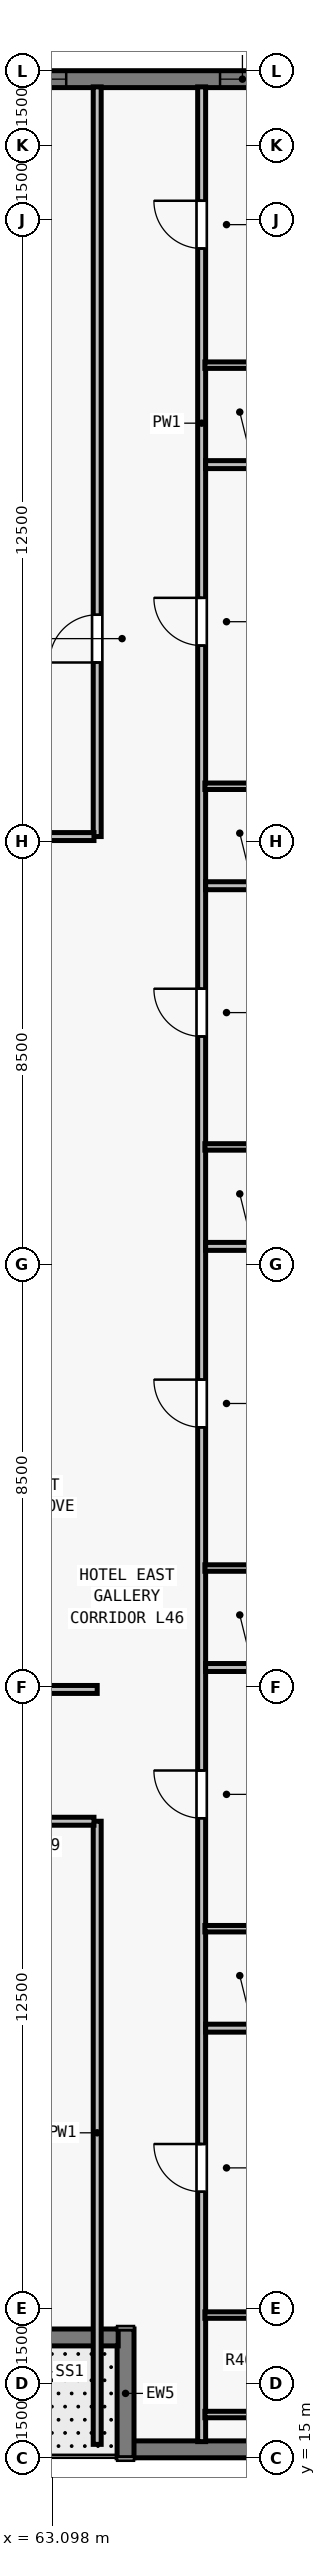
"""IFC4 building model, lengths in metres.
Left out: names, types, materials, properties, quantities, classifications, styles, units other than length and angle.
Written with IfcOpenShell. Run it as: python <this file> out.ifc"""

import sys

from ifc_helpers import new_model, si_unit, direction, frame, frame_2d, origin, place, context, subcontext, project, spatial, rectangle, extrude, element, fill, save


model = new_model("IFC4")
c1 = context("Model", 3, precision=1e-05, world=origin(), true_north=direction((0.0, 1.0)))
c2 = subcontext(c1, "Body", "Model", "MODEL_VIEW")
j1 = project(units=[si_unit("LENGTHUNIT", "METRE"), si_unit("PLANEANGLEUNIT", "RADIAN")], contexts=[c1])
p1 = place(None, origin())
s1 = spatial("IfcSite", under=j1, at=p1, CompositionType="ELEMENT")
p2 = place(p1, origin())
s2 = spatial("IfcBuilding", under=s1, at=p2, CompositionType="ELEMENT")
p3 = place(p2, frame((0.0, 0.0, 169.0)))
s3 = spatial("IfcBuildingStorey", under=s2, at=p3, CompositionType="ELEMENT", Elevation=169.0)
p4 = place(p3, frame((32.0, 62.83, 0.0), z_axis=(0.0, 0.0, 1.0), x_axis=(1.0, 0.0, 0.0)))
e1 = element("IfcWall", 1, at=p4, inside=s3, PredefinedType="SOLIDWALL", context=c2, shape_type="SweptSolid", body=[
    extrude(rectangle(XDim=39.682, YDim=0.34, at=frame_2d((19.841, 0.0))), origin(), (0.0, 0.0, 1.0), 3.28),
])
p5 = place(p4, frame((4.952, 0.0, 0.8)))
e2 = element("IfcOpeningElement", 2, at=p5, cuts=e1, PredefinedType="OPENING", context=c2, shape_type="SweptSolid", body=[
    extrude(rectangle(XDim=1.35, YDim=1.66, at=frame_2d((0.675, 0.83))), frame((0.0, 0.18, 0.0), z_axis=(0.0, -1.0, 0.0), x_axis=(1.0, 0.0, 0.0)), (0.0, 0.0, 1.0), 0.36),
])
p6 = place(p4, frame((12.059, 0.0, 0.8)))
e3 = element("IfcOpeningElement", 3, at=p6, cuts=e1, PredefinedType="OPENING", context=c2, shape_type="SweptSolid", body=[
    extrude(rectangle(XDim=1.35, YDim=1.66, at=frame_2d((0.675, 0.83))), frame((0.0, 0.18, 0.0), z_axis=(0.0, -1.0, 0.0), x_axis=(1.0, 0.0, 0.0)), (0.0, 0.0, 1.0), 0.36),
])
p7 = place(p4, frame((19.166, 0.0, 0.8)))
e4 = element("IfcOpeningElement", 4, at=p7, cuts=e1, PredefinedType="OPENING", context=c2, shape_type="SweptSolid", body=[
    extrude(rectangle(XDim=1.35, YDim=1.66, at=frame_2d((0.675, 0.83))), frame((0.0, 0.18, 0.0), z_axis=(0.0, -1.0, 0.0), x_axis=(1.0, 0.0, 0.0)), (0.0, 0.0, 1.0), 0.36),
])
p8 = place(p4, frame((21.27, 0.0, 0.8)))
e5 = element("IfcOpeningElement", 5, at=p8, cuts=e1, PredefinedType="OPENING", context=c2, shape_type="SweptSolid", body=[
    extrude(rectangle(XDim=1.75, YDim=1.66, at=frame_2d((0.875, 0.83))), frame((0.0, 0.18, 0.0), z_axis=(0.0, -1.0, 0.0), x_axis=(1.0, 0.0, 0.0)), (0.0, 0.0, 1.0), 0.36),
])
p9 = place(p4, frame((26.273, 0.0, 0.8)))
e6 = element("IfcOpeningElement", 6, at=p9, cuts=e1, PredefinedType="OPENING", context=c2, shape_type="SweptSolid", body=[
    extrude(rectangle(XDim=1.35, YDim=1.66, at=frame_2d((0.675, 0.83))), frame((0.0, 0.18, 0.0), z_axis=(0.0, -1.0, 0.0), x_axis=(1.0, 0.0, 0.0)), (0.0, 0.0, 1.0), 0.36),
])
p10 = place(p4, frame((29.627, 0.0, 0.8)))
e7 = element("IfcOpeningElement", 7, at=p10, cuts=e1, PredefinedType="OPENING", context=c2, shape_type="SweptSolid", body=[
    extrude(rectangle(XDim=1.75, YDim=1.66, at=frame_2d((0.875, 0.83))), frame((0.0, 0.18, 0.0), z_axis=(0.0, -1.0, 0.0), x_axis=(1.0, 0.0, 0.0)), (0.0, 0.0, 1.0), 0.36),
])
p11 = place(p4, frame((34.47, 0.0, 0.8)))
e8 = element("IfcOpeningElement", 8, at=p11, cuts=e1, PredefinedType="OPENING", context=c2, shape_type="SweptSolid", body=[
    extrude(rectangle(XDim=0.9, YDim=1.66, at=frame_2d((0.45, 0.83))), frame((0.0, 0.18, 0.0), z_axis=(0.0, -1.0, 0.0), x_axis=(1.0, 0.0, 0.0)), (0.0, 0.0, 1.0), 0.36),
])
p12 = place(p3, frame((72.0, 15.17, 0.0), z_axis=(0.0, 0.0, 1.0), x_axis=(-1.0, 0.0, 0.0)))
e9 = element("IfcWall", 9, at=p12, inside=s3, PredefinedType="SOLIDWALL", context=c2, shape_type="SweptSolid", body=[
    extrude(rectangle(XDim=7.282, YDim=0.34, at=frame_2d((3.641, 0.0))), origin(), (0.0, 0.0, 1.0), 3.28),
])
p13 = place(p3, frame((64.57, 15.0, 0.0), z_axis=(0.0, 0.0, 1.0), x_axis=(0.0, 1.0, 0.0)))
e10 = element("IfcWall", 10, at=p13, inside=s3, PredefinedType="SOLIDWALL", context=c2, shape_type="SweptSolid", body=[
    extrude(rectangle(XDim=2.59, YDim=0.34, at=frame_2d((1.295, 0.0))), origin(), (0.0, 0.0, 1.0), 3.28),
])
p14 = place(p3, frame((64.422, 17.42, 0.0), z_axis=(0.0, 0.0, 1.0), x_axis=(-1.0, 0.0, 0.0)))
e11 = element("IfcWall", 11, at=p14, inside=s3, PredefinedType="SOLIDWALL", context=c2, shape_type="SweptSolid", body=[
    extrude(rectangle(XDim=5.762, YDim=0.34, at=frame_2d((2.881, 0.0))), origin(), (0.0, 0.0, 1.0), 3.28),
])
p15 = place(p14, frame((2.381, 0.0, 0.0)))
e12 = element("IfcOpeningElement", 12, at=p15, cuts=e11, PredefinedType="OPENING", context=c2, shape_type="SweptSolid", body=[
    extrude(rectangle(XDim=1.0, YDim=2.15, at=frame_2d((0.5, 1.075))), frame((0.0, 0.18, 0.0), z_axis=(0.0, -1.0, 0.0), x_axis=(1.0, 0.0, 0.0)), (0.0, 0.0, 1.0), 0.36),
])
p16 = place(p3, frame((66.1, 15.325, 0.0), z_axis=(0.0, 0.0, 1.0), x_axis=(0.0, 1.0, 0.0)))
e13 = element("IfcWall", 13, at=p16, inside=s3, PredefinedType="PARTITIONING", context=c2, shape_type="SweptSolid", body=[
    extrude(rectangle(XDim=47.35, YDim=0.16, at=frame_2d((23.675, 0.0))), origin(), (0.0, 0.0, 1.0), 2.555),
])
p17 = place(p16, frame((5.025, 0.0, 0.0)))
e14 = element("IfcOpeningElement", 14, at=p17, cuts=e13, PredefinedType="OPENING", context=c2, shape_type="SweptSolid", body=[
    extrude(rectangle(XDim=0.96, YDim=2.15, at=frame_2d((0.48, 1.075))), frame((0.0, 0.09, 0.0), z_axis=(0.0, -1.0, 0.0), x_axis=(1.0, 0.0, 0.0)), (0.0, 0.0, 1.0), 0.18),
])
p18 = place(p16, frame((12.535, 0.0, 0.0)))
e15 = element("IfcOpeningElement", 15, at=p18, cuts=e13, PredefinedType="OPENING", context=c2, shape_type="SweptSolid", body=[
    extrude(rectangle(XDim=0.96, YDim=2.15, at=frame_2d((0.48, 1.075))), frame((0.0, 0.09, 0.0), z_axis=(0.0, -1.0, 0.0), x_axis=(1.0, 0.0, 0.0)), (0.0, 0.0, 1.0), 0.18),
])
p19 = place(p16, frame((20.395, 0.0, 0.0)))
e16 = element("IfcOpeningElement", 16, at=p19, cuts=e13, PredefinedType="OPENING", context=c2, shape_type="SweptSolid", body=[
    extrude(rectangle(XDim=0.96, YDim=2.15, at=frame_2d((0.48, 1.075))), frame((0.0, 0.09, 0.0), z_axis=(0.0, -1.0, 0.0), x_axis=(1.0, 0.0, 0.0)), (0.0, 0.0, 1.0), 0.18),
])
p20 = place(p16, frame((28.255, 0.0, 0.0)))
e17 = element("IfcOpeningElement", 17, at=p20, cuts=e13, PredefinedType="OPENING", context=c2, shape_type="SweptSolid", body=[
    extrude(rectangle(XDim=0.96, YDim=2.15, at=frame_2d((0.48, 1.075))), frame((0.0, 0.09, 0.0), z_axis=(0.0, -1.0, 0.0), x_axis=(1.0, 0.0, 0.0)), (0.0, 0.0, 1.0), 0.18),
])
p21 = place(p16, frame((36.115, 0.0, 0.0)))
e18 = element("IfcOpeningElement", 18, at=p21, cuts=e13, PredefinedType="OPENING", context=c2, shape_type="SweptSolid", body=[
    extrude(rectangle(XDim=0.96, YDim=2.15, at=frame_2d((0.48, 1.075))), frame((0.0, 0.09, 0.0), z_axis=(0.0, -1.0, 0.0), x_axis=(1.0, 0.0, 0.0)), (0.0, 0.0, 1.0), 0.18),
])
p22 = place(p16, frame((44.1, 0.0, 0.0)))
e19 = element("IfcOpeningElement", 19, at=p22, cuts=e13, PredefinedType="OPENING", context=c2, shape_type="SweptSolid", body=[
    extrude(rectangle(XDim=0.96, YDim=2.15, at=frame_2d((0.48, 1.075))), frame((0.0, 0.09, 0.0), z_axis=(0.0, -1.0, 0.0), x_axis=(1.0, 0.0, 0.0)), (0.0, 0.0, 1.0), 0.18),
])
p23 = place(p3, frame((64.0, 15.27, 0.0), z_axis=(0.0, 0.0, 1.0), x_axis=(0.0, 1.0, 0.0)))
e20 = element("IfcWall", 20, at=p23, inside=s3, PredefinedType="PARTITIONING", context=c2, shape_type="SweptSolid", body=[
    extrude(rectangle(XDim=12.53, YDim=0.16, at=frame_2d((6.265, 0.0))), origin(), (0.0, 0.0, 1.0), 2.555),
])
p24 = place(p3, frame((64.0, 47.6, 0.0), z_axis=(0.0, 0.0, 1.0), x_axis=(0.0, 1.0, 0.0)))
e21 = element("IfcWall", 21, at=p24, inside=s3, PredefinedType="PARTITIONING", context=c2, shape_type="SweptSolid", body=[
    extrude(rectangle(XDim=15.075, YDim=0.16, at=frame_2d((7.538, 0.0))), origin(), (0.0, 0.0, 1.0), 2.555),
])
p25 = place(p24, frame((3.5, 0.0, 0.0)))
e22 = element("IfcOpeningElement", 22, at=p25, cuts=e21, PredefinedType="OPENING", context=c2, shape_type="SweptSolid", body=[
    extrude(rectangle(XDim=0.96, YDim=2.12, at=frame_2d((0.48, 1.06))), frame((0.0, 0.09, 0.0), z_axis=(0.0, -1.0, 0.0), x_axis=(1.0, 0.0, 0.0)), (0.0, 0.0, 1.0), 0.18),
])
p26 = place(p3, frame((60.765, 30.45, 0.0), z_axis=(0.0, 0.0, 1.0), x_axis=(1.0, 0.0, 0.0)))
e23 = element("IfcWall", 23, at=p26, inside=s3, PredefinedType="PARTITIONING", context=c2, shape_type="SweptSolid", body=[
    extrude(rectangle(XDim=3.235, YDim=0.16, at=frame_2d((1.618, 0.0))), origin(), (0.0, 0.0, 1.0), 3.28),
])
p27 = place(p3, frame((60.765, 47.6, 0.0), z_axis=(0.0, 0.0, 1.0), x_axis=(1.0, 0.0, 0.0)))
e24 = element("IfcWall", 24, at=p27, inside=s3, PredefinedType="PARTITIONING", context=c2, shape_type="SweptSolid", body=[
    extrude(rectangle(XDim=3.17, YDim=0.16, at=frame_2d((1.585, 0.0))), origin(), (0.0, 0.0, 1.0), 3.28),
])
p28 = place(p3, frame((41.865, 27.8, 0.0), z_axis=(0.0, 0.0, 1.0), x_axis=(1.0, 0.0, 0.0)))
e25 = element("IfcWall", 25, at=p28, inside=s3, PredefinedType="PARTITIONING", context=c2, shape_type="SweptSolid", body=[
    extrude(rectangle(XDim=22.07, YDim=0.16, at=frame_2d((11.035, 0.0))), origin(), (0.0, 0.0, 1.0), 3.28),
])
p29 = place(p28, frame((4.232, 0.0, 0.0)))
e26 = element("IfcOpeningElement", 26, at=p29, cuts=e25, PredefinedType="OPENING", context=c2, shape_type="SweptSolid", body=[
    extrude(rectangle(XDim=0.96, YDim=2.15, at=frame_2d((0.48, 1.075))), frame((0.0, 0.09, 0.0), z_axis=(0.0, -1.0, 0.0), x_axis=(1.0, 0.0, 0.0)), (0.0, 0.0, 1.0), 0.18),
])
p30 = place(p28, frame((11.545, 0.0, 0.0)))
e27 = element("IfcOpeningElement", 27, at=p30, cuts=e25, PredefinedType="OPENING", context=c2, shape_type="SweptSolid", body=[
    extrude(rectangle(XDim=0.96, YDim=2.15, at=frame_2d((0.48, 1.075))), frame((0.0, 0.09, 0.0), z_axis=(0.0, -1.0, 0.0), x_axis=(1.0, 0.0, 0.0)), (0.0, 0.0, 1.0), 0.18),
])
p31 = place(p28, frame((19.168, 0.0, 0.0)))
e28 = element("IfcOpeningElement", 28, at=p31, cuts=e25, PredefinedType="OPENING", context=c2, shape_type="SweptSolid", body=[
    extrude(rectangle(XDim=0.96, YDim=2.15, at=frame_2d((0.48, 1.075))), frame((0.0, 0.09, 0.0), z_axis=(0.0, -1.0, 0.0), x_axis=(1.0, 0.0, 0.0)), (0.0, 0.0, 1.0), 0.18),
])
for number, where, z_axis, x_axis in (
    (29, (66.165, 15.87, 0.0), (0.0, 0.0, 1.0), (1.0, 0.0, 0.0)),
    (30, (66.165, 17.87, 0.0), (0.0, 0.0, 1.0), (1.0, 0.0, 0.0)),
):
    element("IfcWall", number, at=place(p3, frame(where, z_axis=z_axis, x_axis=x_axis)), inside=s3, PredefinedType="PLUMBINGWALL", context=c2, shape_type="SweptSolid", body=[
        extrude(rectangle(XDim=2.315, YDim=0.13, at=frame_2d((1.157, 0.0))), origin(), (0.0, 0.0, 1.0), 3.28),
    ])
p32 = place(p3, frame((66.18, 23.639, 0.0), z_axis=(0.0, 0.0, 1.0), x_axis=(1.0, 0.0, 0.0)))
e31 = element("IfcWall", 31, at=p32, inside=s3, PredefinedType="PARTITIONING", context=c2, shape_type="SweptSolid", body=[
    extrude(rectangle(XDim=9.495, YDim=0.16, at=frame_2d((4.748, 0.0))), origin(), (0.0, 0.0, 1.0), 2.896),
])
p33 = place(p3, frame((66.165, 25.639, 0.0), z_axis=(0.0, 0.0, 1.0), x_axis=(1.0, 0.0, 0.0)))
e32 = element("IfcWall", 32, at=p33, inside=s3, PredefinedType="PLUMBINGWALL", context=c2, shape_type="SweptSolid", body=[
    extrude(rectangle(XDim=2.315, YDim=0.13, at=frame_2d((1.157, 0.0))), origin(), (0.0, 0.0, 1.0), 2.896),
])
p34 = place(p3, frame((66.18, 30.891, 0.0), z_axis=(0.0, 0.0, 1.0), x_axis=(1.0, 0.0, 0.0)))
e33 = element("IfcWall", 33, at=p34, inside=s3, PredefinedType="PARTITIONING", context=c2, shape_type="SweptSolid", body=[
    extrude(rectangle(XDim=9.495, YDim=0.16, at=frame_2d((4.748, 0.0))), origin(), (0.0, 0.0, 1.0), 3.28),
])
p35 = place(p3, frame((66.165, 32.891, 0.0), z_axis=(0.0, 0.0, 1.0), x_axis=(1.0, 0.0, 0.0)))
e34 = element("IfcWall", 34, at=p35, inside=s3, PredefinedType="PLUMBINGWALL", context=c2, shape_type="SweptSolid", body=[
    extrude(rectangle(XDim=2.315, YDim=0.13, at=frame_2d((1.157, 0.0))), origin(), (0.0, 0.0, 1.0), 3.28),
])
p36 = place(p3, frame((66.18, 39.359, 0.0), z_axis=(0.0, 0.0, 1.0), x_axis=(1.0, 0.0, 0.0)))
e35 = element("IfcWall", 35, at=p36, inside=s3, PredefinedType="PARTITIONING", context=c2, shape_type="SweptSolid", body=[
    extrude(rectangle(XDim=9.495, YDim=0.16, at=frame_2d((4.748, 0.0))), origin(), (0.0, 0.0, 1.0), 3.28),
])
p37 = place(p3, frame((66.165, 41.359, 0.0), z_axis=(0.0, 0.0, 1.0), x_axis=(1.0, 0.0, 0.0)))
e36 = element("IfcWall", 36, at=p37, inside=s3, PredefinedType="PLUMBINGWALL", context=c2, shape_type="SweptSolid", body=[
    extrude(rectangle(XDim=2.315, YDim=0.13, at=frame_2d((1.157, 0.0))), origin(), (0.0, 0.0, 1.0), 3.28),
])
p38 = place(p3, frame((66.18, 46.611, 0.0), z_axis=(0.0, 0.0, 1.0), x_axis=(1.0, 0.0, 0.0)))
e37 = element("IfcWall", 37, at=p38, inside=s3, PredefinedType="PARTITIONING", context=c2, shape_type="SweptSolid", body=[
    extrude(rectangle(XDim=9.495, YDim=0.16, at=frame_2d((4.748, 0.0))), origin(), (0.0, 0.0, 1.0), 3.28),
])
p39 = place(p3, frame((66.165, 48.611, 0.0), z_axis=(0.0, 0.0, 1.0), x_axis=(1.0, 0.0, 0.0)))
e38 = element("IfcWall", 38, at=p39, inside=s3, PredefinedType="PLUMBINGWALL", context=c2, shape_type="SweptSolid", body=[
    extrude(rectangle(XDim=2.315, YDim=0.13, at=frame_2d((1.157, 0.0))), origin(), (0.0, 0.0, 1.0), 3.28),
])
p40 = place(p3, frame((66.18, 55.079, 0.0), z_axis=(0.0, 0.0, 1.0), x_axis=(1.0, 0.0, 0.0)))
e39 = element("IfcWall", 39, at=p40, inside=s3, PredefinedType="PARTITIONING", context=c2, shape_type="SweptSolid", body=[
    extrude(rectangle(XDim=9.495, YDim=0.16, at=frame_2d((4.748, 0.0))), origin(), (0.0, 0.0, 1.0), 2.896),
])
p41 = place(p3, frame((66.165, 57.079, 0.0), z_axis=(0.0, 0.0, 1.0), x_axis=(1.0, 0.0, 0.0)))
e40 = element("IfcWall", 40, at=p41, inside=s3, PredefinedType="PLUMBINGWALL", context=c2, shape_type="SweptSolid", body=[
    extrude(rectangle(XDim=2.315, YDim=0.13, at=frame_2d((1.157, 0.0))), origin(), (0.0, 0.0, 1.0), 3.28),
])
p42 = place(p10, origin())
e41 = element("IfcWindow", 41, at=p42, inside=s3, PartitioningType="SINGLE_PANEL", PredefinedType="WINDOW", context=c2, shape_type="SweptSolid", body=[
    extrude(rectangle(XDim=1.75, YDim=1.66, at=frame_2d((0.875, 0.83))), frame((0.0, -0.05, 0.0), z_axis=(0.0, -1.0, 0.0), x_axis=(1.0, 0.0, 0.0)), (0.0, 0.0, 1.0), 0.06),
])
fill(e7, e41)
p43 = place(p11, origin())
e42 = element("IfcWindow", 42, at=p43, inside=s3, PartitioningType="SINGLE_PANEL", PredefinedType="WINDOW", context=c2, shape_type="SweptSolid", body=[
    extrude(rectangle(XDim=0.9, YDim=1.66, at=frame_2d((0.45, 0.83))), frame((0.0, -0.04, 0.0), z_axis=(0.0, -1.0, 0.0), x_axis=(1.0, 0.0, 0.0)), (0.0, 0.0, 1.0), 0.06),
])
fill(e8, e42)
p44 = place(p25, origin())
e43 = element("IfcDoor", 43, at=p44, inside=s3, OperationType="SINGLE_SWING_LEFT", PredefinedType="DOOR", context=c2, shape_type="SweptSolid", body=[
    extrude(rectangle(XDim=0.96, YDim=2.12, at=frame_2d((0.48, 1.06))), frame((0.0, 0.025, 0.0), z_axis=(0.0, -1.0, 0.0), x_axis=(1.0, 0.0, 0.0)), (0.0, 0.0, 1.0), 0.05),
])
fill(e22, e43)
p45 = place(p17, origin())
e44 = element("IfcDoor", 44, at=p45, inside=s3, OperationType="SINGLE_SWING_RIGHT", PredefinedType="DOOR", context=c2, shape_type="SweptSolid", body=[
    extrude(rectangle(XDim=0.96, YDim=2.15, at=frame_2d((0.48, 1.075))), frame((0.0, 0.025, 0.0), z_axis=(0.0, -1.0, 0.0), x_axis=(1.0, 0.0, 0.0)), (0.0, 0.0, 1.0), 0.05),
])
fill(e14, e44)
p46 = place(p18, origin())
e45 = element("IfcDoor", 45, at=p46, inside=s3, OperationType="SINGLE_SWING_RIGHT", PredefinedType="DOOR", context=c2, shape_type="SweptSolid", body=[
    extrude(rectangle(XDim=0.96, YDim=2.15, at=frame_2d((0.48, 1.075))), frame((0.0, 0.025, 0.0), z_axis=(0.0, -1.0, 0.0), x_axis=(1.0, 0.0, 0.0)), (0.0, 0.0, 1.0), 0.05),
])
fill(e15, e45)
p47 = place(p19, origin())
e46 = element("IfcDoor", 46, at=p47, inside=s3, OperationType="SINGLE_SWING_RIGHT", PredefinedType="DOOR", context=c2, shape_type="SweptSolid", body=[
    extrude(rectangle(XDim=0.96, YDim=2.15, at=frame_2d((0.48, 1.075))), frame((0.0, 0.025, 0.0), z_axis=(0.0, -1.0, 0.0), x_axis=(1.0, 0.0, 0.0)), (0.0, 0.0, 1.0), 0.05),
])
fill(e16, e46)
p48 = place(p20, origin())
e47 = element("IfcDoor", 47, at=p48, inside=s3, OperationType="SINGLE_SWING_RIGHT", PredefinedType="DOOR", context=c2, shape_type="SweptSolid", body=[
    extrude(rectangle(XDim=0.96, YDim=2.15, at=frame_2d((0.48, 1.075))), frame((0.0, 0.025, 0.0), z_axis=(0.0, -1.0, 0.0), x_axis=(1.0, 0.0, 0.0)), (0.0, 0.0, 1.0), 0.05),
])
fill(e17, e47)
p49 = place(p21, origin())
e48 = element("IfcDoor", 48, at=p49, inside=s3, OperationType="SINGLE_SWING_RIGHT", PredefinedType="DOOR", context=c2, shape_type="SweptSolid", body=[
    extrude(rectangle(XDim=0.96, YDim=2.15, at=frame_2d((0.48, 1.075))), frame((0.0, 0.025, 0.0), z_axis=(0.0, -1.0, 0.0), x_axis=(1.0, 0.0, 0.0)), (0.0, 0.0, 1.0), 0.05),
])
fill(e18, e48)
p50 = place(p22, origin())
e49 = element("IfcDoor", 49, at=p50, inside=s3, OperationType="SINGLE_SWING_RIGHT", PredefinedType="DOOR", context=c2, shape_type="SweptSolid", body=[
    extrude(rectangle(XDim=0.96, YDim=2.15, at=frame_2d((0.48, 1.075))), frame((0.0, 0.025, 0.0), z_axis=(0.0, -1.0, 0.0), x_axis=(1.0, 0.0, 0.0)), (0.0, 0.0, 1.0), 0.05),
])
fill(e19, e49)
save(model, sys.argv[1])
